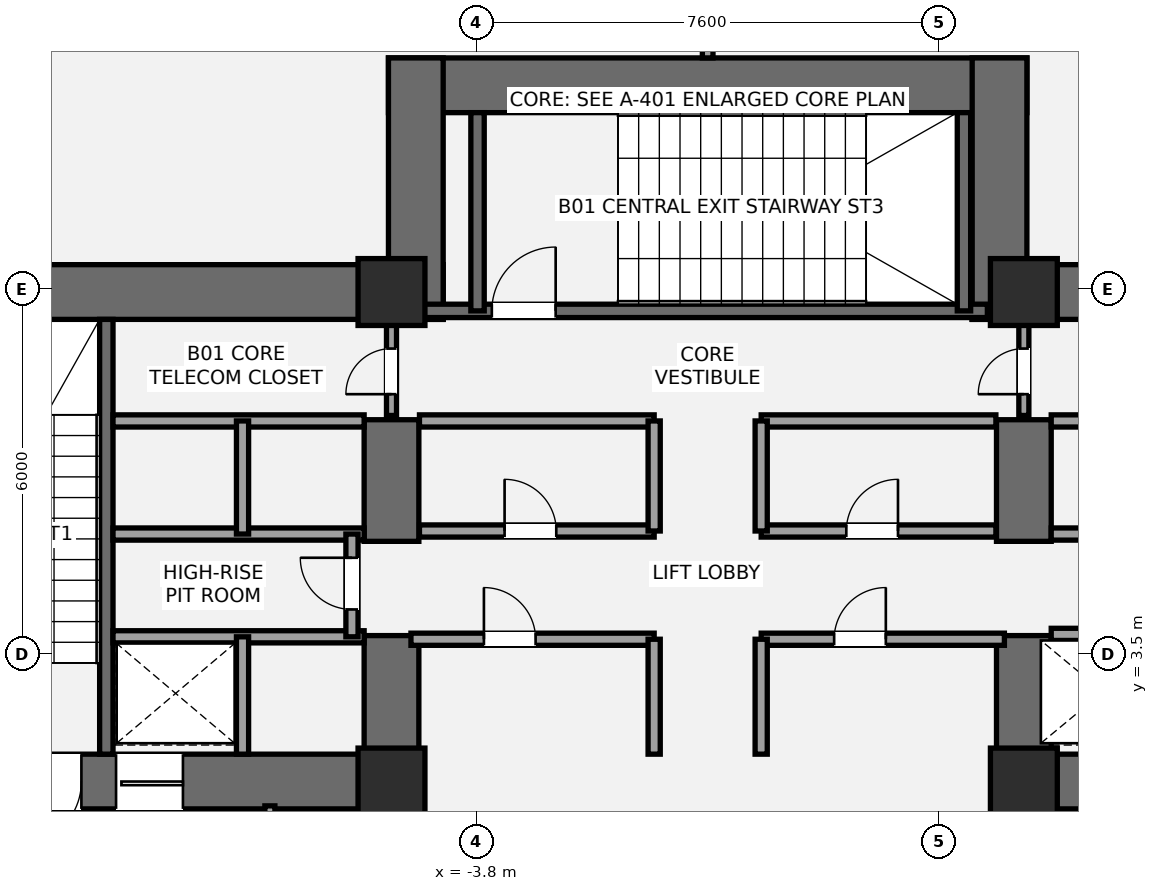
"""IFC4 building model, lengths in metres.
Left out: names, types, materials, properties, quantities, classifications, styles, units other than length and angle.
Written with IfcOpenShell. Run it as: python <this file> out.ifc"""

import sys

from ifc_helpers import new_model, si_unit, direction, frame, frame_2d, origin, origin_2d, place, context, subcontext, project, spatial, rectangle, extrude, element, fill, save


model = new_model("IFC4")
c1 = context("Model", 3, precision=1e-05, world=origin(), true_north=direction((0.0, 1.0)))
c2 = subcontext(c1, "Body", "Model", "MODEL_VIEW")
j1 = project(units=[si_unit("LENGTHUNIT", "METRE"), si_unit("PLANEANGLEUNIT", "RADIAN")], contexts=[c1])
p1 = place(None, origin())
s1 = spatial("IfcSite", under=j1, at=p1, CompositionType="ELEMENT")
p2 = place(p1, origin())
s2 = spatial("IfcBuilding", under=s1, at=p2, CompositionType="ELEMENT")
p3 = place(p2, frame((0.0, 0.0, -4.4)))
s3 = spatial("IfcBuildingStorey", under=s2, at=p3, CompositionType="ELEMENT", Elevation=-4.4)
p4 = place(p3, frame((-14.05, 9.45, 0.0), z_axis=(0.0, 0.0, 1.0), x_axis=(1.0, 0.0, 0.0)))
e1 = element("IfcWall", 1, at=p4, inside=s3, PredefinedType="SHEAR", context=c2, shape_type="SweptSolid", body=[
    extrude(rectangle(XDim=9.7, YDim=0.9, at=frame_2d((4.85, 0.0))), origin(), (0.0, 0.0, 1.0), 4.4),
])
p5 = place(p3, frame((-4.75, 1.4, 0.0), z_axis=(0.0, 0.0, 1.0), x_axis=(-1.0, 0.0, 0.0)))
e2 = element("IfcWall", 2, at=p5, inside=s3, PredefinedType="SHEAR", context=c2, shape_type="SweptSolid", body=[
    extrude(rectangle(XDim=9.3, YDim=0.9, at=frame_2d((4.65, 0.0))), origin(), (0.0, 0.0, 1.0), 4.4),
])
p6 = place(p5, frame((5.55, 0.0, 0.0)))
e3 = element("IfcOpeningElement", 3, at=p6, cuts=e2, PredefinedType="OPENING", context=c2, shape_type="SweptSolid", body=[
    extrude(rectangle(XDim=1.05, YDim=2.15, at=frame_2d((0.525, 1.075))), frame((0.0, 0.46, 0.0), z_axis=(0.0, -1.0, 0.0), x_axis=(1.0, 0.0, 0.0)), (0.0, 0.0, 1.0), 0.92),
])
p7 = place(p5, frame((3.88, 0.0, 0.0)))
e4 = element("IfcOpeningElement", 4, at=p7, cuts=e2, PredefinedType="OPENING", context=c2, shape_type="SweptSolid", body=[
    extrude(rectangle(XDim=1.1, YDim=2.2, at=frame_2d((0.55, 1.1))), frame((0.0, 0.46, 0.0), z_axis=(0.0, -1.0, 0.0), x_axis=(1.0, 0.0, 0.0)), (0.0, 0.0, 1.0), 0.92),
])
p8 = place(p3, frame((-5.2, 0.95, 0.0), z_axis=(0.0, 0.0, 1.0), x_axis=(0.0, 1.0, 0.0)))
e5 = element("IfcWall", 5, at=p8, inside=s3, PredefinedType="SHEAR", context=c2, shape_type="SweptSolid", body=[
    extrude(rectangle(XDim=2.85, YDim=0.9, at=frame_2d((1.425, 0.0))), origin(), (0.0, 0.0, 1.0), 4.4),
])
p9 = place(p3, frame((-5.2, 5.35, 0.0), z_axis=(0.0, 0.0, 1.0), x_axis=(0.0, 1.0, 0.0)))
e6 = element("IfcWall", 6, at=p9, inside=s3, PredefinedType="SHEAR", context=c2, shape_type="SweptSolid", body=[
    extrude(rectangle(XDim=2.0, YDim=0.9, at=frame_2d((1.0, 0.0))), origin(), (0.0, 0.0, 1.0), 4.4),
])
p10 = place(p3, frame((-9.89, 1.85, 0.0), z_axis=(0.0, 0.0, 1.0), x_axis=(0.0, 1.0, 0.0)))
e7 = element("IfcWall", 7, at=p10, inside=s3, PredefinedType="SHEAR", context=c2, shape_type="SweptSolid", body=[
    extrude(rectangle(XDim=7.15, YDim=0.22, at=frame_2d((3.575, 0.0))), origin(), (0.0, 0.0, 1.0), 4.4),
])
p11 = place(p3, frame((4.35, 9.45, 0.0), z_axis=(0.0, 0.0, 1.0), x_axis=(1.0, 0.0, 0.0)))
e8 = element("IfcWall", 8, at=p11, inside=s3, PredefinedType="SHEAR", context=c2, shape_type="SweptSolid", body=[
    extrude(rectangle(XDim=9.7, YDim=0.9, at=frame_2d((4.85, 0.0))), origin(), (0.0, 0.0, 1.0), 4.4),
])
p12 = place(p3, frame((14.05, 1.4, 0.0), z_axis=(0.0, 0.0, 1.0), x_axis=(-1.0, 0.0, 0.0)))
e9 = element("IfcWall", 9, at=p12, inside=s3, PredefinedType="SHEAR", context=c2, shape_type="SweptSolid", body=[
    extrude(rectangle(XDim=9.3, YDim=0.9, at=frame_2d((4.65, 0.0))), origin(), (0.0, 0.0, 1.0), 4.4),
])
p13 = place(p12, frame((2.7, 0.0, 0.0)))
e10 = element("IfcOpeningElement", 10, at=p13, cuts=e9, PredefinedType="OPENING", context=c2, shape_type="SweptSolid", body=[
    extrude(rectangle(XDim=1.05, YDim=2.15, at=frame_2d((0.525, 1.075))), frame((0.0, 0.46, 0.0), z_axis=(0.0, -1.0, 0.0), x_axis=(1.0, 0.0, 0.0)), (0.0, 0.0, 1.0), 0.92),
])
p14 = place(p12, frame((4.7, 0.0, 0.0)))
e11 = element("IfcOpeningElement", 11, at=p14, cuts=e9, PredefinedType="OPENING", context=c2, shape_type="SweptSolid", body=[
    extrude(rectangle(XDim=1.1, YDim=2.2, at=frame_2d((0.55, 1.1))), frame((0.0, 0.46, 0.0), z_axis=(0.0, -1.0, 0.0), x_axis=(1.0, 0.0, 0.0)), (0.0, 0.0, 1.0), 0.92),
])
p15 = place(p3, frame((5.2, 0.95, 0.0), z_axis=(0.0, 0.0, 1.0), x_axis=(0.0, 1.0, 0.0)))
e12 = element("IfcWall", 12, at=p15, inside=s3, PredefinedType="SHEAR", context=c2, shape_type="SweptSolid", body=[
    extrude(rectangle(XDim=2.85, YDim=0.9, at=frame_2d((1.425, 0.0))), origin(), (0.0, 0.0, 1.0), 4.4),
])
p16 = place(p3, frame((5.2, 5.35, 0.0), z_axis=(0.0, 0.0, 1.0), x_axis=(0.0, 1.0, 0.0)))
e13 = element("IfcWall", 13, at=p16, inside=s3, PredefinedType="SHEAR", context=c2, shape_type="SweptSolid", body=[
    extrude(rectangle(XDim=2.0, YDim=0.9, at=frame_2d((1.0, 0.0))), origin(), (0.0, 0.0, 1.0), 4.4),
])
p17 = place(p3, frame((-5.25, 12.85, 0.0), z_axis=(0.0, 0.0, 1.0), x_axis=(1.0, 0.0, 0.0)))
e14 = element("IfcWall", 14, at=p17, inside=s3, PredefinedType="SHEAR", context=c2, shape_type="SweptSolid", body=[
    extrude(rectangle(XDim=10.5, YDim=0.9, at=frame_2d((5.25, 0.0))), origin(), (0.0, 0.0, 1.0), 4.4),
])
for number, where, z_axis, x_axis in (
    (15, (-4.8, 9.0, 0.0), (0.0, 0.0, 1.0), (0.0, 1.0, 0.0)),
    (16, (4.8, 9.0, 0.0), (0.0, 0.0, 1.0), (0.0, 1.0, 0.0)),
):
    element("IfcWall", number, at=place(p3, frame(where, z_axis=z_axis, x_axis=x_axis)), inside=s3, PredefinedType="SHEAR", context=c2, shape_type="SweptSolid", body=[
        extrude(rectangle(XDim=4.3, YDim=0.9, at=frame_2d((2.15, 0.0))), origin(), (0.0, 0.0, 1.0), 4.4),
    ])
p18 = place(p3, frame((-4.7, 9.14, 0.0), z_axis=(0.0, 0.0, 1.0), x_axis=(1.0, 0.0, 0.0)))
e17 = element("IfcWall", 17, at=p18, inside=s3, PredefinedType="SHEAR", context=c2, shape_type="SweptSolid", body=[
    extrude(rectangle(XDim=9.3, YDim=0.22, at=frame_2d((4.65, 0.0))), origin(), (0.0, 0.0, 1.0), 4.4),
])
p19 = place(p18, frame((1.15, 0.0, 0.0)))
e18 = element("IfcOpeningElement", 18, at=p19, cuts=e17, PredefinedType="OPENING", context=c2, shape_type="SweptSolid", body=[
    extrude(rectangle(XDim=1.05, YDim=2.15, at=frame_2d((0.525, 1.075))), frame((0.0, 0.12, 0.0), z_axis=(0.0, -1.0, 0.0), x_axis=(1.0, 0.0, 0.0)), (0.0, 0.0, 1.0), 0.24),
])
for number, where, z_axis, x_axis in (
    (19, (-3.785, 9.14, 0.0), (0.0, 0.0, 1.0), (0.0, 1.0, 0.0)),
    (20, (4.215, 9.14, 0.0), (0.0, 0.0, 1.0), (0.0, 1.0, 0.0)),
):
    element("IfcWall", number, at=place(p3, frame(where, z_axis=z_axis, x_axis=x_axis)), inside=s3, PredefinedType="SHEAR", context=c2, shape_type="SweptSolid", body=[
        extrude(rectangle(XDim=3.26, YDim=0.22, at=frame_2d((1.63, 0.0))), origin(), (0.0, 0.0, 1.0), 4.4),
    ])
for number, where, z_axis, x_axis in (
    (21, (-5.2, 1.4, 0.0), (0.0, 0.0, 1.0), (1.0, 0.0, 0.0)),
    (22, (-5.2, 9.45, 0.0), (0.0, 0.0, 1.0), (1.0, 0.0, 0.0)),
    (23, (5.2, 1.4, 0.0), (0.0, 0.0, 1.0), (1.0, 0.0, 0.0)),
    (24, (5.2, 9.45, 0.0), (0.0, 0.0, 1.0), (1.0, 0.0, 0.0)),
):
    element("IfcColumn", number, at=place(p3, frame(where, z_axis=z_axis, x_axis=x_axis)), inside=s3, PredefinedType="COLUMN", context=c2, shape_type="SweptSolid", body=[
        extrude(rectangle(XDim=1.1, YDim=1.1, at=origin_2d()), origin(), (0.0, 0.0, 1.0), 4.4),
    ])
p20 = place(p3, frame((-7.2, -2.15, 0.0), z_axis=(0.0, 0.0, 1.0), x_axis=(0.0, 1.0, 0.0)))
e25 = element("IfcWall", 25, at=p20, inside=s3, PredefinedType="PARTITIONING", context=c2, shape_type="SweptSolid", body=[
    extrude(rectangle(XDim=3.15, YDim=0.165, at=frame_2d((1.575, 0.0))), origin(), (0.0, 0.0, 1.0), 4.14),
])
p21 = place(p3, frame((-4.95, -2.15, 0.0), z_axis=(0.0, 0.0, 1.0), x_axis=(0.0, 1.0, 0.0)))
e26 = element("IfcWall", 26, at=p21, inside=s3, PredefinedType="SOLIDWALL", context=c2, shape_type="SweptSolid", body=[
    extrude(rectangle(XDim=3.15, YDim=0.2, at=frame_2d((1.575, 0.0))), origin(), (0.0, 0.0, 1.0), 3.508),
])
p22 = place(p21, frame((0.95, 0.0, 0.0)))
e27 = element("IfcOpeningElement", 27, at=p22, cuts=e26, PredefinedType="OPENING", context=c2, shape_type="SweptSolid", body=[
    extrude(rectangle(XDim=0.75, YDim=2.1, at=frame_2d((0.375, 1.05))), frame((0.0, 0.11, 0.0), z_axis=(0.0, -1.0, 0.0), x_axis=(1.0, 0.0, 0.0)), (0.0, 0.0, 1.0), 0.22),
])
p23 = place(p3, frame((4.95, -2.15, 0.0), z_axis=(0.0, 0.0, 1.0), x_axis=(0.0, 1.0, 0.0)))
e28 = element("IfcWall", 28, at=p23, inside=s3, PredefinedType="SOLIDWALL", context=c2, shape_type="SweptSolid", body=[
    extrude(rectangle(XDim=3.15, YDim=0.2, at=frame_2d((1.575, 0.0))), origin(), (0.0, 0.0, 1.0), 3.508),
])
p24 = place(p23, frame((0.95, 0.0, 0.0)))
e29 = element("IfcOpeningElement", 29, at=p24, cuts=e28, PredefinedType="OPENING", context=c2, shape_type="SweptSolid", body=[
    extrude(rectangle(XDim=0.75, YDim=2.1, at=frame_2d((0.375, 1.05))), frame((0.0, 0.11, 0.0), z_axis=(0.0, -1.0, 0.0), x_axis=(1.0, 0.0, 0.0)), (0.0, 0.0, 1.0), 0.22),
])
p25 = place(p3, frame((-9.78, 3.78, 0.0), z_axis=(0.0, 0.0, 1.0), x_axis=(1.0, 0.0, 0.0)))
e30 = element("IfcWall", 30, at=p25, inside=s3, PredefinedType="SOLIDWALL", context=c2, shape_type="SweptSolid", body=[
    extrude(rectangle(XDim=4.13, YDim=0.2, at=frame_2d((2.065, 0.0))), origin(), (0.0, 0.0, 1.0), 4.14),
])
p26 = place(p3, frame((-7.65, 1.85, 0.0), z_axis=(0.0, 0.0, 1.0), x_axis=(0.0, 1.0, 0.0)))
e31 = element("IfcWall", 31, at=p26, inside=s3, PredefinedType="SOLIDWALL", context=c2, shape_type="SweptSolid", body=[
    extrude(rectangle(XDim=1.93, YDim=0.2, at=frame_2d((0.965, 0.0))), origin(), (0.0, 0.0, 1.0), 4.14),
])
for number, where, z_axis, x_axis in (
    (32, (-9.78, 5.47, 0.0), (0.0, 0.0, 1.0), (1.0, 0.0, 0.0)),
    (33, (-9.78, 7.33, 0.0), (0.0, 0.0, 1.0), (1.0, 0.0, 0.0)),
):
    element("IfcWall", number, at=place(p3, frame(where, z_axis=z_axis, x_axis=x_axis)), inside=s3, PredefinedType="SOLIDWALL", context=c2, shape_type="SweptSolid", body=[
        extrude(rectangle(XDim=4.13, YDim=0.2, at=frame_2d((2.065, 0.0))), origin(), (0.0, 0.0, 1.0), 4.14),
    ])
p27 = place(p3, frame((-7.65, 5.47, 0.0), z_axis=(0.0, 0.0, 1.0), x_axis=(0.0, 1.0, 0.0)))
e34 = element("IfcWall", 34, at=p27, inside=s3, PredefinedType="SOLIDWALL", context=c2, shape_type="SweptSolid", body=[
    extrude(rectangle(XDim=1.86, YDim=0.2, at=frame_2d((0.93, 0.0))), origin(), (0.0, 0.0, 1.0), 4.14),
])
p28 = place(p3, frame((-5.85, 3.78, 0.0), z_axis=(0.0, 0.0, 1.0), x_axis=(0.0, 1.0, 0.0)))
e35 = element("IfcWall", 35, at=p28, inside=s3, PredefinedType="SOLIDWALL", context=c2, shape_type="SweptSolid", body=[
    extrude(rectangle(XDim=1.69, YDim=0.2, at=frame_2d((0.845, 0.0))), origin(), (0.0, 0.0, 1.0), 4.14),
])
p29 = place(p28, frame((0.45, 0.0, 0.0)))
e36 = element("IfcOpeningElement", 36, at=p29, cuts=e35, PredefinedType="OPENING", context=c2, shape_type="SweptSolid", body=[
    extrude(rectangle(XDim=0.85, YDim=2.1, at=frame_2d((0.425, 1.05))), frame((0.0, 0.11, 0.0), z_axis=(0.0, -1.0, 0.0), x_axis=(1.0, 0.0, 0.0)), (0.0, 0.0, 1.0), 0.22),
])
p30 = place(p3, frame((5.65, 3.82, 0.0), z_axis=(0.0, 0.0, 1.0), x_axis=(1.0, 0.0, 0.0)))
e37 = element("IfcWall", 37, at=p30, inside=s3, PredefinedType="SOLIDWALL", context=c2, shape_type="SweptSolid", body=[
    extrude(rectangle(XDim=4.13, YDim=0.2, at=frame_2d((2.065, 0.0))), origin(), (0.0, 0.0, 1.0), 4.14),
])
p31 = place(p30, frame((0.65, 0.0, 0.0)))
e38 = element("IfcOpeningElement", 38, at=p31, cuts=e37, PredefinedType="OPENING", context=c2, shape_type="SweptSolid", body=[
    extrude(rectangle(XDim=1.2, YDim=2.2, at=frame_2d((0.6, 1.1))), frame((0.0, 0.11, 0.0), z_axis=(0.0, -1.0, 0.0), x_axis=(1.0, 0.0, 0.0)), (0.0, 0.0, 1.0), 0.22),
])
for number, where, z_axis, x_axis in (
    (39, (5.65, 5.47, 0.0), (0.0, 0.0, 1.0), (1.0, 0.0, 0.0)),
    (40, (5.65, 7.33, 0.0), (0.0, 0.0, 1.0), (1.0, 0.0, 0.0)),
):
    element("IfcWall", number, at=place(p3, frame(where, z_axis=z_axis, x_axis=x_axis)), inside=s3, PredefinedType="SOLIDWALL", context=c2, shape_type="SweptSolid", body=[
        extrude(rectangle(XDim=4.13, YDim=0.2, at=frame_2d((2.065, 0.0))), origin(), (0.0, 0.0, 1.0), 4.14),
    ])
p32 = place(p3, frame((-4.88, 3.74, 0.0), z_axis=(0.0, 0.0, 1.0), x_axis=(1.0, 0.0, 0.0)))
e41 = element("IfcWall", 41, at=p32, inside=s3, PredefinedType="SOLIDWALL", context=c2, shape_type="SweptSolid", body=[
    extrude(rectangle(XDim=4.0, YDim=0.2, at=frame_2d((2.0, 0.0))), origin(), (0.0, 0.0, 1.0), 4.14),
])
p33 = place(p32, frame((1.2, 0.0, 0.0)))
e42 = element("IfcOpeningElement", 42, at=p33, cuts=e41, PredefinedType="OPENING", context=c2, shape_type="SweptSolid", body=[
    extrude(rectangle(XDim=0.85, YDim=2.1, at=frame_2d((0.425, 1.05))), frame((0.0, 0.11, 0.0), z_axis=(0.0, -1.0, 0.0), x_axis=(1.0, 0.0, 0.0)), (0.0, 0.0, 1.0), 0.22),
])
p34 = place(p3, frame((0.88, 3.74, 0.0), z_axis=(0.0, 0.0, 1.0), x_axis=(1.0, 0.0, 0.0)))
e43 = element("IfcWall", 43, at=p34, inside=s3, PredefinedType="SOLIDWALL", context=c2, shape_type="SweptSolid", body=[
    extrude(rectangle(XDim=4.0, YDim=0.2, at=frame_2d((2.0, 0.0))), origin(), (0.0, 0.0, 1.0), 4.14),
])
p35 = place(p34, frame((1.2, 0.0, 0.0)))
e44 = element("IfcOpeningElement", 44, at=p35, cuts=e43, PredefinedType="OPENING", context=c2, shape_type="SweptSolid", body=[
    extrude(rectangle(XDim=0.85, YDim=2.1, at=frame_2d((0.425, 1.05))), frame((0.0, 0.11, 0.0), z_axis=(0.0, -1.0, 0.0), x_axis=(1.0, 0.0, 0.0)), (0.0, 0.0, 1.0), 0.22),
])
for number, where, z_axis, x_axis in (
    (45, (-0.88, 1.85, 0.0), (0.0, 0.0, 1.0), (0.0, 1.0, 0.0)),
    (46, (0.88, 1.85, 0.0), (0.0, 0.0, 1.0), (0.0, 1.0, 0.0)),
):
    element("IfcWall", number, at=place(p3, frame(where, z_axis=z_axis, x_axis=x_axis)), inside=s3, PredefinedType="SOLIDWALL", context=c2, shape_type="SweptSolid", body=[
        extrude(rectangle(XDim=1.89, YDim=0.2, at=frame_2d((0.945, 0.0))), origin(), (0.0, 0.0, 1.0), 4.14),
    ])
p36 = place(p3, frame((-4.74, 5.52, 0.0), z_axis=(0.0, 0.0, 1.0), x_axis=(1.0, 0.0, 0.0)))
e47 = element("IfcWall", 47, at=p36, inside=s3, PredefinedType="SOLIDWALL", context=c2, shape_type="SweptSolid", body=[
    extrude(rectangle(XDim=3.86, YDim=0.2, at=frame_2d((1.93, 0.0))), origin(), (0.0, 0.0, 1.0), 4.14),
])
p37 = place(p36, frame((1.4, 0.0, 0.0)))
e48 = element("IfcOpeningElement", 48, at=p37, cuts=e47, PredefinedType="OPENING", context=c2, shape_type="SweptSolid", body=[
    extrude(rectangle(XDim=0.85, YDim=2.1, at=frame_2d((0.425, 1.05))), frame((0.0, 0.11, 0.0), z_axis=(0.0, -1.0, 0.0), x_axis=(1.0, 0.0, 0.0)), (0.0, 0.0, 1.0), 0.22),
])
p38 = place(p3, frame((0.88, 5.52, 0.0), z_axis=(0.0, 0.0, 1.0), x_axis=(1.0, 0.0, 0.0)))
e49 = element("IfcWall", 49, at=p38, inside=s3, PredefinedType="SOLIDWALL", context=c2, shape_type="SweptSolid", body=[
    extrude(rectangle(XDim=3.86, YDim=0.2, at=frame_2d((1.93, 0.0))), origin(), (0.0, 0.0, 1.0), 4.14),
])
p39 = place(p38, frame((1.4, 0.0, 0.0)))
e50 = element("IfcOpeningElement", 50, at=p39, cuts=e49, PredefinedType="OPENING", context=c2, shape_type="SweptSolid", body=[
    extrude(rectangle(XDim=0.85, YDim=2.1, at=frame_2d((0.425, 1.05))), frame((0.0, 0.11, 0.0), z_axis=(0.0, -1.0, 0.0), x_axis=(1.0, 0.0, 0.0)), (0.0, 0.0, 1.0), 0.22),
])
for number, where, z_axis, x_axis in (
    (51, (-4.74, 7.33, 0.0), (0.0, 0.0, 1.0), (1.0, 0.0, 0.0)),
    (52, (0.88, 7.33, 0.0), (0.0, 0.0, 1.0), (1.0, 0.0, 0.0)),
):
    element("IfcWall", number, at=place(p3, frame(where, z_axis=z_axis, x_axis=x_axis)), inside=s3, PredefinedType="SOLIDWALL", context=c2, shape_type="SweptSolid", body=[
        extrude(rectangle(XDim=3.86, YDim=0.2, at=frame_2d((1.93, 0.0))), origin(), (0.0, 0.0, 1.0), 4.14),
    ])
for number, where, z_axis, x_axis in (
    (53, (-0.88, 5.52, 0.0), (0.0, 0.0, 1.0), (0.0, 1.0, 0.0)),
    (54, (0.88, 5.52, 0.0), (0.0, 0.0, 1.0), (0.0, 1.0, 0.0)),
):
    element("IfcWall", number, at=place(p3, frame(where, z_axis=z_axis, x_axis=x_axis)), inside=s3, PredefinedType="SOLIDWALL", context=c2, shape_type="SweptSolid", body=[
        extrude(rectangle(XDim=1.81, YDim=0.2, at=frame_2d((0.905, 0.0))), origin(), (0.0, 0.0, 1.0), 4.14),
    ])
p40 = place(p3, frame((-5.2, 7.42, 0.0), z_axis=(0.0, 0.0, 1.0), x_axis=(0.0, 1.0, 0.0)))
e55 = element("IfcWall", 55, at=p40, inside=s3, PredefinedType="PARTITIONING", context=c2, shape_type="SweptSolid", body=[
    extrude(rectangle(XDim=1.58, YDim=0.165, at=frame_2d((0.79, 0.0))), origin(), (0.0, 0.0, 1.0), 4.14),
])
p41 = place(p40, frame((0.35, 0.0, 0.0)))
e56 = element("IfcOpeningElement", 56, at=p41, cuts=e55, PredefinedType="OPENING", context=c2, shape_type="SweptSolid", body=[
    extrude(rectangle(XDim=0.75, YDim=2.1, at=frame_2d((0.375, 1.05))), frame((0.0, 0.093, 0.0), z_axis=(0.0, -1.0, 0.0), x_axis=(1.0, 0.0, 0.0)), (0.0, 0.0, 1.0), 0.185),
])
p42 = place(p3, frame((5.2, 7.42, 0.0), z_axis=(0.0, 0.0, 1.0), x_axis=(0.0, 1.0, 0.0)))
e57 = element("IfcWall", 57, at=p42, inside=s3, PredefinedType="PARTITIONING", context=c2, shape_type="SweptSolid", body=[
    extrude(rectangle(XDim=1.58, YDim=0.165, at=frame_2d((0.79, 0.0))), origin(), (0.0, 0.0, 1.0), 4.14),
])
p43 = place(p42, frame((0.35, 0.0, 0.0)))
e58 = element("IfcOpeningElement", 58, at=p43, cuts=e57, PredefinedType="OPENING", context=c2, shape_type="SweptSolid", body=[
    extrude(rectangle(XDim=0.75, YDim=2.1, at=frame_2d((0.375, 1.05))), frame((0.0, 0.093, 0.0), z_axis=(0.0, -1.0, 0.0), x_axis=(1.0, 0.0, 0.0)), (0.0, 0.0, 1.0), 0.185),
])
p44 = place(p3, frame((0.0, 13.3, 0.0), z_axis=(0.0, 0.0, 1.0), x_axis=(0.0, 1.0, 0.0)))
e59 = element("IfcWall", 59, at=p44, inside=s3, PredefinedType="PARTITIONING", context=c2, shape_type="SweptSolid", body=[
    extrude(rectangle(XDim=7.787, YDim=0.175, at=frame_2d((3.894, 0.0))), origin(), (0.0, 0.0, 1.0), 4.14),
])
p45 = place(p6, origin())
e60 = element("IfcDoor", 60, at=p45, inside=s3, OperationType="SINGLE_SWING_RIGHT", PredefinedType="DOOR", context=c2, shape_type="SweptSolid", body=[
    extrude(rectangle(XDim=1.05, YDim=2.15, at=frame_2d((0.525, 1.075))), frame((0.0, 0.025, 0.0), z_axis=(0.0, -1.0, 0.0), x_axis=(1.0, 0.0, 0.0)), (0.0, 0.0, 1.0), 0.05),
])
fill(e3, e60)
p46 = place(p19, origin())
e61 = element("IfcDoor", 61, at=p46, inside=s3, OperationType="SINGLE_SWING_RIGHT", PredefinedType="DOOR", context=c2, shape_type="SweptSolid", body=[
    extrude(rectangle(XDim=1.05, YDim=2.15, at=frame_2d((0.525, 1.075))), frame((0.0, 0.025, 0.0), z_axis=(0.0, -1.0, 0.0), x_axis=(1.0, 0.0, 0.0)), (0.0, 0.0, 1.0), 0.05),
])
fill(e18, e61)
p47 = place(p7, origin())
e62 = element("IfcDoor", 62, at=p47, inside=s3, OperationType="SLIDING_TO_LEFT", PredefinedType="DOOR", context=c2, shape_type="SweptSolid", body=[
    extrude(rectangle(XDim=1.1, YDim=2.2, at=frame_2d((0.55, 1.1))), frame((0.0, 0.025, 0.0), z_axis=(0.0, -1.0, 0.0), x_axis=(1.0, 0.0, 0.0)), (0.0, 0.0, 1.0), 0.05),
])
fill(e4, e62)
p48 = place(p29, origin())
e63 = element("IfcDoor", 63, at=p48, inside=s3, OperationType="SINGLE_SWING_RIGHT", PredefinedType="DOOR", context=c2, shape_type="SweptSolid", body=[
    extrude(rectangle(XDim=0.85, YDim=2.1, at=frame_2d((0.425, 1.05))), frame((0.0, 0.025, 0.0), z_axis=(0.0, -1.0, 0.0), x_axis=(1.0, 0.0, 0.0)), (0.0, 0.0, 1.0), 0.05),
])
fill(e36, e63)
p49 = place(p33, origin())
e64 = element("IfcDoor", 64, at=p49, inside=s3, OperationType="SINGLE_SWING_LEFT", PredefinedType="DOOR", context=c2, shape_type="SweptSolid", body=[
    extrude(rectangle(XDim=0.85, YDim=2.1, at=frame_2d((0.425, 1.05))), frame((0.0, 0.025, 0.0), z_axis=(0.0, -1.0, 0.0), x_axis=(1.0, 0.0, 0.0)), (0.0, 0.0, 1.0), 0.05),
])
fill(e42, e64)
p50 = place(p35, origin())
e65 = element("IfcDoor", 65, at=p50, inside=s3, OperationType="SINGLE_SWING_RIGHT", PredefinedType="DOOR", context=c2, shape_type="SweptSolid", body=[
    extrude(rectangle(XDim=0.85, YDim=2.1, at=frame_2d((0.425, 1.05))), frame((0.0, 0.025, 0.0), z_axis=(0.0, -1.0, 0.0), x_axis=(1.0, 0.0, 0.0)), (0.0, 0.0, 1.0), 0.05),
])
fill(e44, e65)
p51 = place(p37, origin())
e66 = element("IfcDoor", 66, at=p51, inside=s3, OperationType="SINGLE_SWING_LEFT", PredefinedType="DOOR", context=c2, shape_type="SweptSolid", body=[
    extrude(rectangle(XDim=0.85, YDim=2.1, at=frame_2d((0.425, 1.05))), frame((0.0, 0.025, 0.0), z_axis=(0.0, -1.0, 0.0), x_axis=(1.0, 0.0, 0.0)), (0.0, 0.0, 1.0), 0.05),
])
fill(e48, e66)
p52 = place(p39, origin())
e67 = element("IfcDoor", 67, at=p52, inside=s3, OperationType="SINGLE_SWING_RIGHT", PredefinedType="DOOR", context=c2, shape_type="SweptSolid", body=[
    extrude(rectangle(XDim=0.85, YDim=2.1, at=frame_2d((0.425, 1.05))), frame((0.0, 0.025, 0.0), z_axis=(0.0, -1.0, 0.0), x_axis=(1.0, 0.0, 0.0)), (0.0, 0.0, 1.0), 0.05),
])
fill(e50, e67)
p53 = place(p41, origin())
e68 = element("IfcDoor", 68, at=p53, inside=s3, OperationType="SINGLE_SWING_LEFT", PredefinedType="DOOR", context=c2, shape_type="SweptSolid", body=[
    extrude(rectangle(XDim=0.75, YDim=2.1, at=frame_2d((0.375, 1.05))), frame((0.0, 0.025, 0.0), z_axis=(0.0, -1.0, 0.0), x_axis=(1.0, 0.0, 0.0)), (0.0, 0.0, 1.0), 0.05),
])
fill(e56, e68)
p54 = place(p43, origin())
e69 = element("IfcDoor", 69, at=p54, inside=s3, OperationType="SINGLE_SWING_LEFT", PredefinedType="DOOR", context=c2, shape_type="SweptSolid", body=[
    extrude(rectangle(XDim=0.75, YDim=2.1, at=frame_2d((0.375, 1.05))), frame((0.0, 0.025, 0.0), z_axis=(0.0, -1.0, 0.0), x_axis=(1.0, 0.0, 0.0)), (0.0, 0.0, 1.0), 0.05),
])
fill(e58, e69)
save(model, sys.argv[1])
